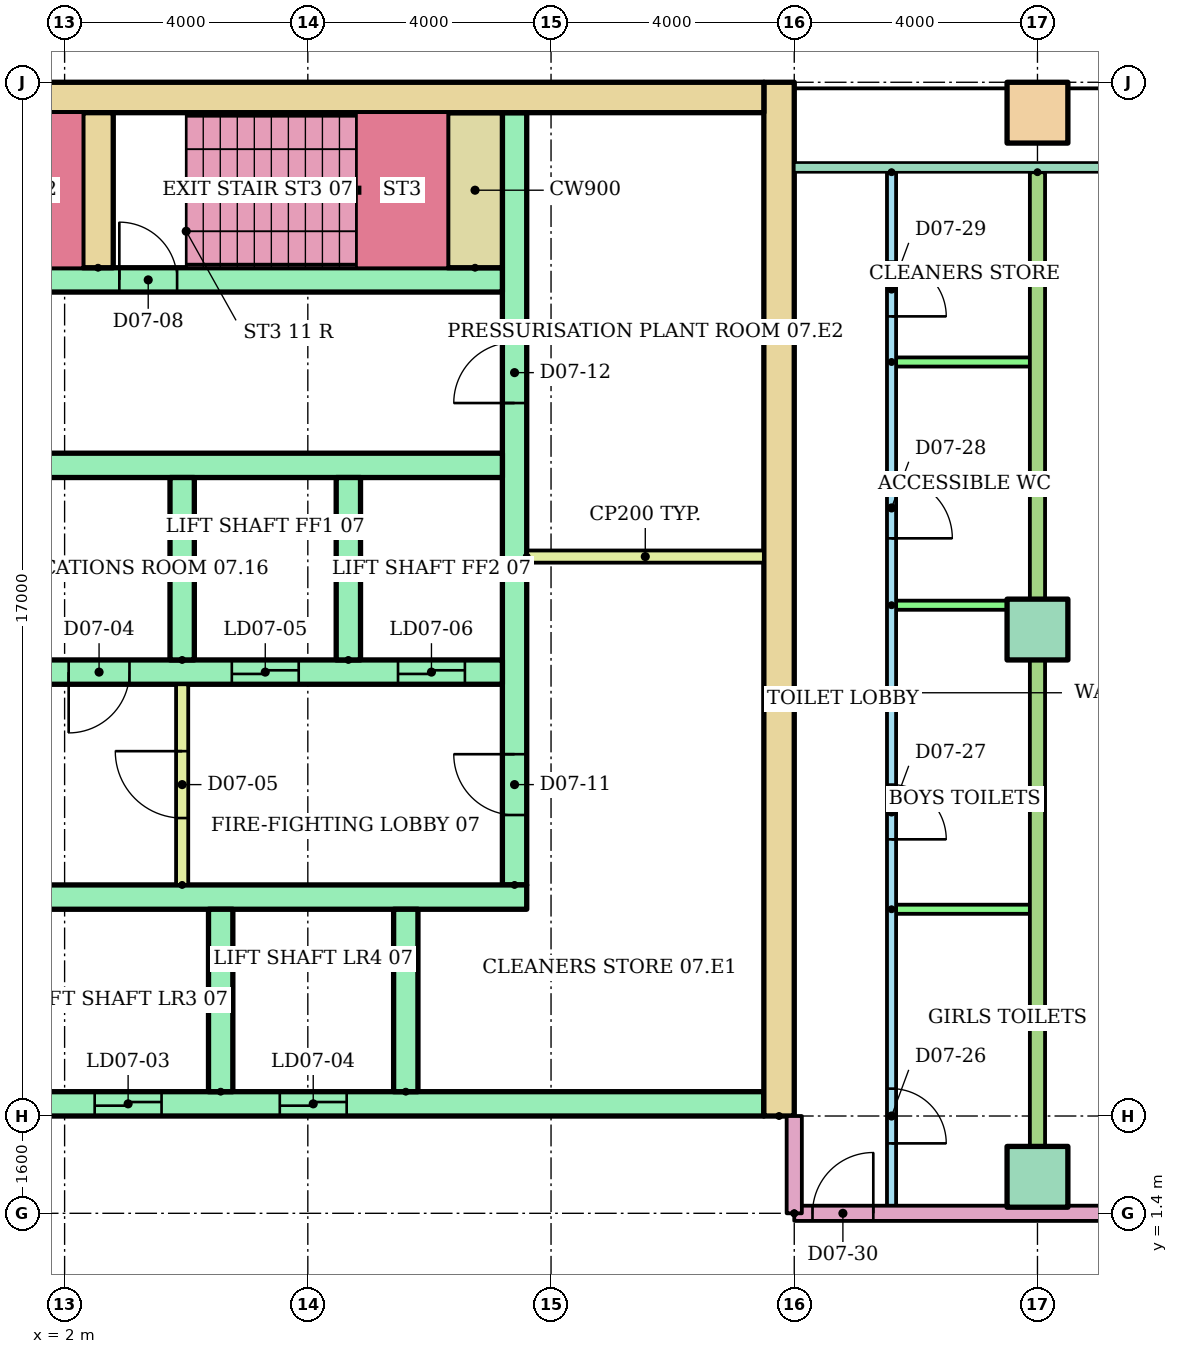
"""IFC4 building model, lengths in metres.
Left out: names, types, materials, properties, quantities, classifications, styles, units other than length and angle.
Written with IfcOpenShell. Run it as: python <this file> out.ifc"""

import sys

from ifc_helpers import new_model, si_unit, direction, frame, frame_2d, origin, origin_2d, place, context, subcontext, project, spatial, rectangle, hollow_rectangle, extrude, element, fill, save


model = new_model("IFC4")
c1 = context("Model", 3, precision=1e-05, world=origin(), true_north=direction((0.0, 1.0)))
c2 = subcontext(c1, "Body", "Model", "MODEL_VIEW")
j1 = project(units=[si_unit("LENGTHUNIT", "METRE"), si_unit("PLANEANGLEUNIT", "RADIAN")], contexts=[c1])
p1 = place(None, origin())
s1 = spatial("IfcSite", under=j1, at=p1, CompositionType="ELEMENT")
p2 = place(p1, origin())
s2 = spatial("IfcBuilding", under=s1, at=p2, CompositionType="ELEMENT")
p3 = place(p2, frame((0.0, 0.0, 29.9)))
s3 = spatial("IfcBuildingStorey", under=s2, at=p3, CompositionType="ELEMENT", Elevation=29.9)
for number, where in (
    (1, (18.0, 2.0, 0.0)),
    (2, (18.0, 11.0, 0.0)),
):
    element("IfcColumn", number, at=place(p3, frame(where)), inside=s3, PredefinedType="COLUMN", context=c2, shape_type="SweptSolid", body=[
        extrude(rectangle(XDim=1.0, YDim=1.0, at=origin_2d()), origin(), (0.0, 0.0, 1.0), 3.9),
    ])
p4 = place(p3, frame((18.0, 19.5, 0.0)))
e3 = element("IfcColumn", 3, at=p4, inside=s3, PredefinedType="COLUMN", context=c2, shape_type="SweptSolid", body=[
    extrude(hollow_rectangle(XDim=1.0, YDim=1.0, WallThickness=0.05, at=origin_2d()), origin(), (0.0, 0.0, 1.0), 3.9),
])
p5 = place(p3, frame((13.75, 3.0, 0.0), z_axis=(0.0, 0.0, 1.0), x_axis=(0.0, 1.0, 0.0)))
e4 = element("IfcWall", 4, at=p5, inside=s3, PredefinedType="SHEAR", context=c2, shape_type="SweptSolid", body=[
    extrude(rectangle(XDim=17.0, YDim=0.5, at=frame_2d((8.5, 0.0))), origin(), (0.0, 0.0, 1.0), 3.6),
])
p6 = place(p3, frame((-13.5, 19.75, 0.0)))
e5 = element("IfcWall", 5, at=p6, inside=s3, PredefinedType="SHEAR", context=c2, shape_type="SweptSolid", body=[
    extrude(rectangle(XDim=27.0, YDim=0.5, at=frame_2d((13.5, 0.0))), origin(), (0.0, 0.0, 1.0), 3.6),
])
p7 = place(p3, frame((9.4, 6.8, 0.0), z_axis=(0.0, 0.0, 1.0), x_axis=(0.0, 1.0, 0.0)))
e6 = element("IfcWall", 6, at=p7, inside=s3, PredefinedType="SHEAR", context=c2, shape_type="SweptSolid", body=[
    extrude(rectangle(XDim=12.7, YDim=0.4, at=frame_2d((6.35, 0.0))), origin(), (0.0, 0.0, 1.0), 3.6),
])
p8 = place(p7, frame((1.15, 0.0, 0.0)))
e7 = element("IfcOpeningElement", 7, at=p8, cuts=e6, PredefinedType="OPENING", context=c2, shape_type="SweptSolid", body=[
    extrude(rectangle(XDim=1.0, YDim=2.1, at=frame_2d((0.5, 1.05))), frame((0.0, 0.21, 0.0), z_axis=(0.0, -1.0, 0.0), x_axis=(1.0, 0.0, 0.0)), (0.0, 0.0, 1.0), 0.42),
])
p9 = place(p7, frame((7.925, 0.0, 0.0)))
e8 = element("IfcOpeningElement", 8, at=p9, cuts=e6, PredefinedType="OPENING", context=c2, shape_type="SweptSolid", body=[
    extrude(rectangle(XDim=1.0, YDim=2.1, at=frame_2d((0.5, 1.05))), frame((0.0, 0.21, 0.0), z_axis=(0.0, -1.0, 0.0), x_axis=(1.0, 0.0, 0.0)), (0.0, 0.0, 1.0), 0.42),
])
p10 = place(p3, frame((-13.5, 3.2, 0.0)))
e9 = element("IfcWall", 9, at=p10, inside=s3, PredefinedType="SHEAR", context=c2, shape_type="SweptSolid", body=[
    extrude(rectangle(XDim=27.0, YDim=0.4, at=frame_2d((13.5, 0.0))), origin(), (0.0, 0.0, 1.0), 3.6),
])
p11 = place(p10, frame((6.861, 0.0, 0.0)))
e10 = element("IfcOpeningElement", 10, at=p11, cuts=e9, PredefinedType="OPENING", context=c2, shape_type="SweptSolid", body=[
    extrude(rectangle(XDim=1.1, YDim=2.1, at=frame_2d((0.55, 1.05))), frame((0.0, 0.21, 0.0), z_axis=(0.0, -1.0, 0.0), x_axis=(1.0, 0.0, 0.0)), (0.0, 0.0, 1.0), 0.42),
])
p12 = place(p10, frame((9.906, 0.0, 0.0)))
e11 = element("IfcOpeningElement", 11, at=p12, cuts=e9, PredefinedType="OPENING", context=c2, shape_type="SweptSolid", body=[
    extrude(rectangle(XDim=1.1, YDim=2.1, at=frame_2d((0.55, 1.05))), frame((0.0, 0.21, 0.0), z_axis=(0.0, -1.0, 0.0), x_axis=(1.0, 0.0, 0.0)), (0.0, 0.0, 1.0), 0.42),
])
p13 = place(p10, frame((15.994, 0.0, 0.0)))
e12 = element("IfcOpeningElement", 12, at=p13, cuts=e9, PredefinedType="OPENING", context=c2, shape_type="SweptSolid", body=[
    extrude(rectangle(XDim=1.1, YDim=2.1, at=frame_2d((0.55, 1.05))), frame((0.0, 0.21, 0.0), z_axis=(0.0, -1.0, 0.0), x_axis=(1.0, 0.0, 0.0)), (0.0, 0.0, 1.0), 0.42),
])
p14 = place(p10, frame((19.039, 0.0, 0.0)))
e13 = element("IfcOpeningElement", 13, at=p14, cuts=e9, PredefinedType="OPENING", context=c2, shape_type="SweptSolid", body=[
    extrude(rectangle(XDim=1.1, YDim=2.1, at=frame_2d((0.55, 1.05))), frame((0.0, 0.21, 0.0), z_axis=(0.0, -1.0, 0.0), x_axis=(1.0, 0.0, 0.0)), (0.0, 0.0, 1.0), 0.42),
])
p15 = place(p10, frame((12.6, 0.0, 0.0)))
e14 = element("IfcOpeningElement", 14, at=p15, cuts=e9, PredefinedType="OPENING", context=c2, shape_type="SweptSolid", body=[
    extrude(rectangle(XDim=1.8, YDim=2.1, at=frame_2d((0.9, 1.05))), frame((0.0, 0.21, 0.0), z_axis=(0.0, -1.0, 0.0), x_axis=(1.0, 0.0, 0.0)), (0.0, 0.0, 1.0), 0.42),
])
p16 = place(p3, frame((1.522, 6.6, 0.0)))
e15 = element("IfcWall", 15, at=p16, inside=s3, PredefinedType="SHEAR", context=c2, shape_type="SweptSolid", body=[
    extrude(rectangle(XDim=8.078, YDim=0.4, at=frame_2d((4.039, 0.0))), origin(), (0.0, 0.0, 1.0), 3.6),
])
for number, where, z_axis, x_axis in (
    (16, (4.567, 3.4, 0.0), (0.0, 0.0, 1.0), (0.0, 1.0, 0.0)),
    (17, (7.611, 3.4, 0.0), (0.0, 0.0, 1.0), (0.0, 1.0, 0.0)),
):
    element("IfcWall", number, at=place(p3, frame(where, z_axis=z_axis, x_axis=x_axis)), inside=s3, PredefinedType="SHEAR", context=c2, shape_type="SweptSolid", body=[
        extrude(rectangle(XDim=3.0, YDim=0.4, at=frame_2d((1.5, 0.0))), origin(), (0.0, 0.0, 1.0), 3.6),
    ])
p17 = place(p3, frame((1.2, 10.3, 0.0)))
e18 = element("IfcWall", 18, at=p17, inside=s3, PredefinedType="SHEAR", context=c2, shape_type="SweptSolid", body=[
    extrude(rectangle(XDim=8.0, YDim=0.4, at=frame_2d((4.0, 0.0))), origin(), (0.0, 0.0, 1.0), 3.6),
])
p18 = place(p17, frame((3.55, 0.0, 0.0)))
e19 = element("IfcOpeningElement", 19, at=p18, cuts=e18, PredefinedType="OPENING", context=c2, shape_type="SweptSolid", body=[
    extrude(rectangle(XDim=1.1, YDim=2.1, at=frame_2d((0.55, 1.05))), frame((0.0, 0.21, 0.0), z_axis=(0.0, -1.0, 0.0), x_axis=(1.0, 0.0, 0.0)), (0.0, 0.0, 1.0), 0.42),
])
p19 = place(p17, frame((6.283, 0.0, 0.0)))
e20 = element("IfcOpeningElement", 20, at=p19, cuts=e18, PredefinedType="OPENING", context=c2, shape_type="SweptSolid", body=[
    extrude(rectangle(XDim=1.1, YDim=2.1, at=frame_2d((0.55, 1.05))), frame((0.0, 0.21, 0.0), z_axis=(0.0, -1.0, 0.0), x_axis=(1.0, 0.0, 0.0)), (0.0, 0.0, 1.0), 0.42),
])
p20 = place(p17, frame((0.867, 0.0, 0.0)))
e21 = element("IfcOpeningElement", 21, at=p20, cuts=e18, PredefinedType="OPENING", context=c2, shape_type="SweptSolid", body=[
    extrude(rectangle(XDim=1.0, YDim=2.1, at=frame_2d((0.5, 1.05))), frame((0.0, 0.21, 0.0), z_axis=(0.0, -1.0, 0.0), x_axis=(1.0, 0.0, 0.0)), (0.0, 0.0, 1.0), 0.42),
])
p21 = place(p3, frame((1.2, 13.7, 0.0)))
e22 = element("IfcWall", 22, at=p21, inside=s3, PredefinedType="SHEAR", context=c2, shape_type="SweptSolid", body=[
    extrude(rectangle(XDim=8.0, YDim=0.4, at=frame_2d((4.0, 0.0))), origin(), (0.0, 0.0, 1.0), 3.6),
])
for number, where, z_axis, x_axis in (
    (23, (3.933, 10.5, 0.0), (0.0, 0.0, 1.0), (0.0, 1.0, 0.0)),
    (24, (6.667, 10.5, 0.0), (0.0, 0.0, 1.0), (0.0, 1.0, 0.0)),
):
    element("IfcWall", number, at=place(p3, frame(where, z_axis=z_axis, x_axis=x_axis)), inside=s3, PredefinedType="SHEAR", context=c2, shape_type="SweptSolid", body=[
        extrude(rectangle(XDim=3.0, YDim=0.4, at=frame_2d((1.5, 0.0))), origin(), (0.0, 0.0, 1.0), 3.6),
    ])
p22 = place(p3, frame((3.933, 6.8, 0.0), z_axis=(0.0, 0.0, 1.0), x_axis=(0.0, 1.0, 0.0)))
e25 = element("IfcWall", 25, at=p22, inside=s3, PredefinedType="PARTITIONING", context=c2, shape_type="SweptSolid", body=[
    extrude(rectangle(XDim=3.3, YDim=0.2, at=frame_2d((1.65, 0.0))), origin(), (0.0, 0.0, 1.0), 3.6),
])
p23 = place(p22, frame((1.1, 0.0, 0.0)))
e26 = element("IfcOpeningElement", 26, at=p23, cuts=e25, PredefinedType="OPENING", context=c2, shape_type="SweptSolid", body=[
    extrude(rectangle(XDim=1.1, YDim=2.1, at=frame_2d((0.55, 1.05))), frame((0.0, 0.11, 0.0), z_axis=(0.0, -1.0, 0.0), x_axis=(1.0, 0.0, 0.0)), (0.0, 0.0, 1.0), 0.22),
])
p24 = place(p3, frame((-9.2, 16.75, 0.0)))
e27 = element("IfcWall", 27, at=p24, inside=s3, PredefinedType="SHEAR", context=c2, shape_type="SweptSolid", body=[
    extrude(rectangle(XDim=18.4, YDim=0.4, at=frame_2d((9.2, 0.0))), origin(), (0.0, 0.0, 1.0), 3.6),
])
p25 = place(p24, frame((0.1, 0.0, 0.0)))
e28 = element("IfcOpeningElement", 28, at=p25, cuts=e27, PredefinedType="OPENING", context=c2, shape_type="SweptSolid", body=[
    extrude(rectangle(XDim=0.95, YDim=2.1, at=frame_2d((0.475, 1.05))), frame((0.0, 0.21, 0.0), z_axis=(0.0, -1.0, 0.0), x_axis=(1.0, 0.0, 0.0)), (0.0, 0.0, 1.0), 0.42),
])
p26 = place(p24, frame((6.1, 0.0, 0.0)))
e29 = element("IfcOpeningElement", 29, at=p26, cuts=e27, PredefinedType="OPENING", context=c2, shape_type="SweptSolid", body=[
    extrude(rectangle(XDim=0.95, YDim=2.1, at=frame_2d((0.475, 1.05))), frame((0.0, 0.21, 0.0), z_axis=(0.0, -1.0, 0.0), x_axis=(1.0, 0.0, 0.0)), (0.0, 0.0, 1.0), 0.42),
])
p27 = place(p24, frame((12.1, 0.0, 0.0)))
e30 = element("IfcOpeningElement", 30, at=p27, cuts=e27, PredefinedType="OPENING", context=c2, shape_type="SweptSolid", body=[
    extrude(rectangle(XDim=0.95, YDim=2.1, at=frame_2d((0.475, 1.05))), frame((0.0, 0.21, 0.0), z_axis=(0.0, -1.0, 0.0), x_axis=(1.0, 0.0, 0.0)), (0.0, 0.0, 1.0), 0.42),
])
p28 = place(p3, frame((2.55, 16.95, 0.0), z_axis=(0.0, 0.0, 1.0), x_axis=(0.0, 1.0, 0.0)))
e31 = element("IfcWall", 31, at=p28, inside=s3, PredefinedType="SHEAR", context=c2, shape_type="SweptSolid", body=[
    extrude(rectangle(XDim=2.55, YDim=0.5, at=frame_2d((1.275, 0.0))), origin(), (0.0, 0.0, 1.0), 3.6),
])
p29 = place(p3, frame((8.75, 16.95, 0.0), z_axis=(0.0, 0.0, 1.0), x_axis=(0.0, 1.0, 0.0)))
e32 = element("IfcWall", 32, at=p29, inside=s3, PredefinedType="SHEAR", context=c2, shape_type="SweptSolid", body=[
    extrude(rectangle(XDim=2.55, YDim=0.9, at=frame_2d((1.275, 0.0))), origin(), (0.0, 0.0, 1.0), 3.6),
])
p30 = place(p3, frame((9.6, 12.2, 0.0)))
e33 = element("IfcWall", 33, at=p30, inside=s3, PredefinedType="PARTITIONING", context=c2, shape_type="SweptSolid", body=[
    extrude(rectangle(XDim=3.9, YDim=0.2, at=frame_2d((1.95, 0.0))), origin(), (0.0, 0.0, 1.0), 3.6),
])
p31 = place(p3, frame((14.0, 1.4, 0.0)))
e34 = element("IfcWall", 34, at=p31, inside=s3, PredefinedType="PARTITIONING", context=c2, shape_type="SweptSolid", body=[
    extrude(rectangle(XDim=15.0, YDim=0.25, at=frame_2d((7.5, 0.0))), origin(), (0.0, 0.0, 1.0), 3.1),
])
p32 = place(p31, frame((0.3, 0.0, 0.0)))
e35 = element("IfcOpeningElement", 35, at=p32, cuts=e34, PredefinedType="OPENING", context=c2, shape_type="SweptSolid", body=[
    extrude(rectangle(XDim=1.0, YDim=2.1, at=frame_2d((0.5, 1.05))), frame((0.0, 0.135, 0.0), z_axis=(0.0, -1.0, 0.0), x_axis=(1.0, 0.0, 0.0)), (0.0, 0.0, 1.0), 0.27),
])
p33 = place(p31, frame((5.5, 0.0, 0.0)))
e36 = element("IfcOpeningElement", 36, at=p33, cuts=e34, PredefinedType="OPENING", context=c2, shape_type="SweptSolid", body=[
    extrude(rectangle(XDim=1.0, YDim=2.1, at=frame_2d((0.5, 1.05))), frame((0.0, 0.135, 0.0), z_axis=(0.0, -1.0, 0.0), x_axis=(1.0, 0.0, 0.0)), (0.0, 0.0, 1.0), 0.27),
])
p34 = place(p31, frame((13.5, 0.0, 0.0)))
e37 = element("IfcOpeningElement", 37, at=p34, cuts=e34, PredefinedType="OPENING", context=c2, shape_type="SweptSolid", body=[
    extrude(rectangle(XDim=1.0, YDim=2.1, at=frame_2d((0.5, 1.05))), frame((0.0, 0.135, 0.0), z_axis=(0.0, -1.0, 0.0), x_axis=(1.0, 0.0, 0.0)), (0.0, 0.0, 1.0), 0.27),
])
p35 = place(p3, frame((15.6, 18.521, 0.0), z_axis=(0.0, 0.0, 1.0), x_axis=(0.0, -1.0, 0.0)))
e38 = element("IfcWall", 38, at=p35, inside=s3, PredefinedType="PARTITIONING", context=c2, shape_type="SweptSolid", body=[
    extrude(rectangle(XDim=17.121, YDim=0.15, at=frame_2d((8.561, 0.0))), origin(), (0.0, 0.0, 1.0), 3.1),
])
p36 = place(p35, frame((15.071, 0.0, 0.0)))
e39 = element("IfcOpeningElement", 39, at=p36, cuts=e38, PredefinedType="OPENING", context=c2, shape_type="SweptSolid", body=[
    extrude(rectangle(XDim=0.9, YDim=2.1, at=frame_2d((0.45, 1.05))), frame((0.0, 0.085, 0.0), z_axis=(0.0, -1.0, 0.0), x_axis=(1.0, 0.0, 0.0)), (0.0, 0.0, 1.0), 0.17),
])
p37 = place(p35, frame((10.071, 0.0, 0.0)))
e40 = element("IfcOpeningElement", 40, at=p37, cuts=e38, PredefinedType="OPENING", context=c2, shape_type="SweptSolid", body=[
    extrude(rectangle(XDim=0.9, YDim=2.1, at=frame_2d((0.45, 1.05))), frame((0.0, 0.085, 0.0), z_axis=(0.0, -1.0, 0.0), x_axis=(1.0, 0.0, 0.0)), (0.0, 0.0, 1.0), 0.17),
])
p38 = place(p35, frame((5.021, 0.0, 0.0)))
e41 = element("IfcOpeningElement", 41, at=p38, cuts=e38, PredefinedType="OPENING", context=c2, shape_type="SweptSolid", body=[
    extrude(rectangle(XDim=1.0, YDim=2.1, at=frame_2d((0.5, 1.05))), frame((0.0, 0.085, 0.0), z_axis=(0.0, -1.0, 0.0), x_axis=(1.0, 0.0, 0.0)), (0.0, 0.0, 1.0), 0.17),
])
p39 = place(p35, frame((1.471, 0.0, 0.0)))
e42 = element("IfcOpeningElement", 42, at=p39, cuts=e38, PredefinedType="OPENING", context=c2, shape_type="SweptSolid", body=[
    extrude(rectangle(XDim=0.9, YDim=2.1, at=frame_2d((0.45, 1.05))), frame((0.0, 0.085, 0.0), z_axis=(0.0, -1.0, 0.0), x_axis=(1.0, 0.0, 0.0)), (0.0, 0.0, 1.0), 0.17),
])
for number, where in (
    (43, (15.6, 6.4, 0.0)),
    (44, (15.6, 11.4, 0.0)),
    (45, (15.6, 15.4, 0.0)),
):
    element("IfcWall", number, at=place(p3, frame(where)), inside=s3, PredefinedType="PARTITIONING", context=c2, shape_type="SweptSolid", body=[
        extrude(rectangle(XDim=2.4, YDim=0.15, at=frame_2d((1.2, 0.0))), origin(), (0.0, 0.0, 1.0), 3.1),
    ])
p40 = place(p3, frame((18.0, 18.521, 0.0), z_axis=(0.0, 0.0, 1.0), x_axis=(0.0, -1.0, 0.0)))
e46 = element("IfcWall", 46, at=p40, inside=s3, PredefinedType="PARTITIONING", context=c2, shape_type="SweptSolid", body=[
    extrude(rectangle(XDim=17.121, YDim=0.25, at=frame_2d((8.561, 0.0))), origin(), (0.0, 0.0, 1.0), 3.1),
])
p41 = place(p3, frame((14.0, 1.4, 0.0), z_axis=(0.0, 0.0, 1.0), x_axis=(0.0, 1.0, 0.0)))
e47 = element("IfcWall", 47, at=p41, inside=s3, PredefinedType="PARTITIONING", context=c2, shape_type="SweptSolid", body=[
    extrude(rectangle(XDim=1.6, YDim=0.25, at=frame_2d((0.8, 0.0))), origin(), (0.0, 0.0, 1.0), 3.1),
])
p42 = place(p13, origin())
e48 = element("IfcDoor", 48, at=p42, inside=s3, OperationType="SLIDING_TO_LEFT", PredefinedType="DOOR", context=c2, shape_type="SweptSolid", body=[
    extrude(rectangle(XDim=1.1, YDim=2.1, at=frame_2d((0.55, 1.05))), frame((0.0, 0.025, 0.0), z_axis=(0.0, -1.0, 0.0), x_axis=(1.0, 0.0, 0.0)), (0.0, 0.0, 1.0), 0.05),
])
fill(e12, e48)
p43 = place(p14, origin())
e49 = element("IfcDoor", 49, at=p43, inside=s3, OperationType="SLIDING_TO_LEFT", PredefinedType="DOOR", context=c2, shape_type="SweptSolid", body=[
    extrude(rectangle(XDim=1.1, YDim=2.1, at=frame_2d((0.55, 1.05))), frame((0.0, 0.025, 0.0), z_axis=(0.0, -1.0, 0.0), x_axis=(1.0, 0.0, 0.0)), (0.0, 0.0, 1.0), 0.05),
])
fill(e13, e49)
p44 = place(p18, origin())
e50 = element("IfcDoor", 50, at=p44, inside=s3, OperationType="SLIDING_TO_LEFT", PredefinedType="DOOR", context=c2, shape_type="SweptSolid", body=[
    extrude(rectangle(XDim=1.1, YDim=2.1, at=frame_2d((0.55, 1.05))), frame((0.0, 0.025, 0.0), z_axis=(0.0, -1.0, 0.0), x_axis=(1.0, 0.0, 0.0)), (0.0, 0.0, 1.0), 0.05),
])
fill(e19, e50)
p45 = place(p19, origin())
e51 = element("IfcDoor", 51, at=p45, inside=s3, OperationType="SLIDING_TO_LEFT", PredefinedType="DOOR", context=c2, shape_type="SweptSolid", body=[
    extrude(rectangle(XDim=1.1, YDim=2.1, at=frame_2d((0.55, 1.05))), frame((0.0, 0.025, 0.0), z_axis=(0.0, -1.0, 0.0), x_axis=(1.0, 0.0, 0.0)), (0.0, 0.0, 1.0), 0.05),
])
fill(e20, e51)
p46 = place(p20, frame((1.0, 0.0, 0.0), z_axis=(0.0, 0.0, 1.0), x_axis=(-1.0, 0.0, 0.0)))
e52 = element("IfcDoor", 52, at=p46, inside=s3, OperationType="SINGLE_SWING_LEFT", PredefinedType="DOOR", context=c2, shape_type="SweptSolid", body=[
    extrude(rectangle(XDim=1.0, YDim=2.1, at=frame_2d((0.5, 1.05))), frame((0.0, 0.025, 0.0), z_axis=(0.0, -1.0, 0.0), x_axis=(1.0, 0.0, 0.0)), (0.0, 0.0, 1.0), 0.05),
])
fill(e21, e52)
p47 = place(p23, origin())
e53 = element("IfcDoor", 53, at=p47, inside=s3, OperationType="SINGLE_SWING_RIGHT", PredefinedType="DOOR", context=c2, shape_type="SweptSolid", body=[
    extrude(rectangle(XDim=1.1, YDim=2.1, at=frame_2d((0.55, 1.05))), frame((0.0, 0.025, 0.0), z_axis=(0.0, -1.0, 0.0), x_axis=(1.0, 0.0, 0.0)), (0.0, 0.0, 1.0), 0.05),
])
fill(e26, e53)
p48 = place(p27, origin())
e54 = element("IfcDoor", 54, at=p48, inside=s3, OperationType="SINGLE_SWING_LEFT", PredefinedType="DOOR", context=c2, shape_type="SweptSolid", body=[
    extrude(rectangle(XDim=0.95, YDim=2.1, at=frame_2d((0.475, 1.05))), frame((0.0, 0.025, 0.0), z_axis=(0.0, -1.0, 0.0), x_axis=(1.0, 0.0, 0.0)), (0.0, 0.0, 1.0), 0.05),
])
fill(e30, e54)
p49 = place(p8, origin())
e55 = element("IfcDoor", 55, at=p49, inside=s3, OperationType="SINGLE_SWING_RIGHT", PredefinedType="DOOR", context=c2, shape_type="SweptSolid", body=[
    extrude(rectangle(XDim=1.0, YDim=2.1, at=frame_2d((0.5, 1.05))), frame((0.0, 0.025, 0.0), z_axis=(0.0, -1.0, 0.0), x_axis=(1.0, 0.0, 0.0)), (0.0, 0.0, 1.0), 0.05),
])
fill(e7, e55)
p50 = place(p9, origin())
e56 = element("IfcDoor", 56, at=p50, inside=s3, OperationType="SINGLE_SWING_LEFT", PredefinedType="DOOR", context=c2, shape_type="SweptSolid", body=[
    extrude(rectangle(XDim=1.0, YDim=2.1, at=frame_2d((0.5, 1.05))), frame((0.0, 0.025, 0.0), z_axis=(0.0, -1.0, 0.0), x_axis=(1.0, 0.0, 0.0)), (0.0, 0.0, 1.0), 0.05),
])
fill(e8, e56)
p51 = place(p36, origin())
e57 = element("IfcDoor", 57, at=p51, inside=s3, OperationType="SINGLE_SWING_RIGHT", PredefinedType="DOOR", context=c2, shape_type="SweptSolid", body=[
    extrude(rectangle(XDim=0.9, YDim=2.1, at=frame_2d((0.45, 1.05))), frame((0.0, 0.025, 0.0), z_axis=(0.0, -1.0, 0.0), x_axis=(1.0, 0.0, 0.0)), (0.0, 0.0, 1.0), 0.05),
])
fill(e39, e57)
p52 = place(p37, origin())
e58 = element("IfcDoor", 58, at=p52, inside=s3, OperationType="SINGLE_SWING_RIGHT", PredefinedType="DOOR", context=c2, shape_type="SweptSolid", body=[
    extrude(rectangle(XDim=0.9, YDim=2.1, at=frame_2d((0.45, 1.05))), frame((0.0, 0.025, 0.0), z_axis=(0.0, -1.0, 0.0), x_axis=(1.0, 0.0, 0.0)), (0.0, 0.0, 1.0), 0.05),
])
fill(e40, e58)
p53 = place(p38, origin())
e59 = element("IfcDoor", 59, at=p53, inside=s3, OperationType="SINGLE_SWING_RIGHT", PredefinedType="DOOR", context=c2, shape_type="SweptSolid", body=[
    extrude(rectangle(XDim=1.0, YDim=2.1, at=frame_2d((0.5, 1.05))), frame((0.0, 0.025, 0.0), z_axis=(0.0, -1.0, 0.0), x_axis=(1.0, 0.0, 0.0)), (0.0, 0.0, 1.0), 0.05),
])
fill(e41, e59)
p54 = place(p39, origin())
e60 = element("IfcDoor", 60, at=p54, inside=s3, OperationType="SINGLE_SWING_RIGHT", PredefinedType="DOOR", context=c2, shape_type="SweptSolid", body=[
    extrude(rectangle(XDim=0.9, YDim=2.1, at=frame_2d((0.45, 1.05))), frame((0.0, 0.025, 0.0), z_axis=(0.0, -1.0, 0.0), x_axis=(1.0, 0.0, 0.0)), (0.0, 0.0, 1.0), 0.05),
])
fill(e42, e60)
p55 = place(p32, origin())
e61 = element("IfcDoor", 61, at=p55, inside=s3, OperationType="SINGLE_SWING_RIGHT", PredefinedType="DOOR", context=c2, shape_type="SweptSolid", body=[
    extrude(rectangle(XDim=1.0, YDim=2.1, at=frame_2d((0.5, 1.05))), frame((0.0, 0.025, 0.0), z_axis=(0.0, -1.0, 0.0), x_axis=(1.0, 0.0, 0.0)), (0.0, 0.0, 1.0), 0.05),
])
fill(e35, e61)
save(model, sys.argv[1])
